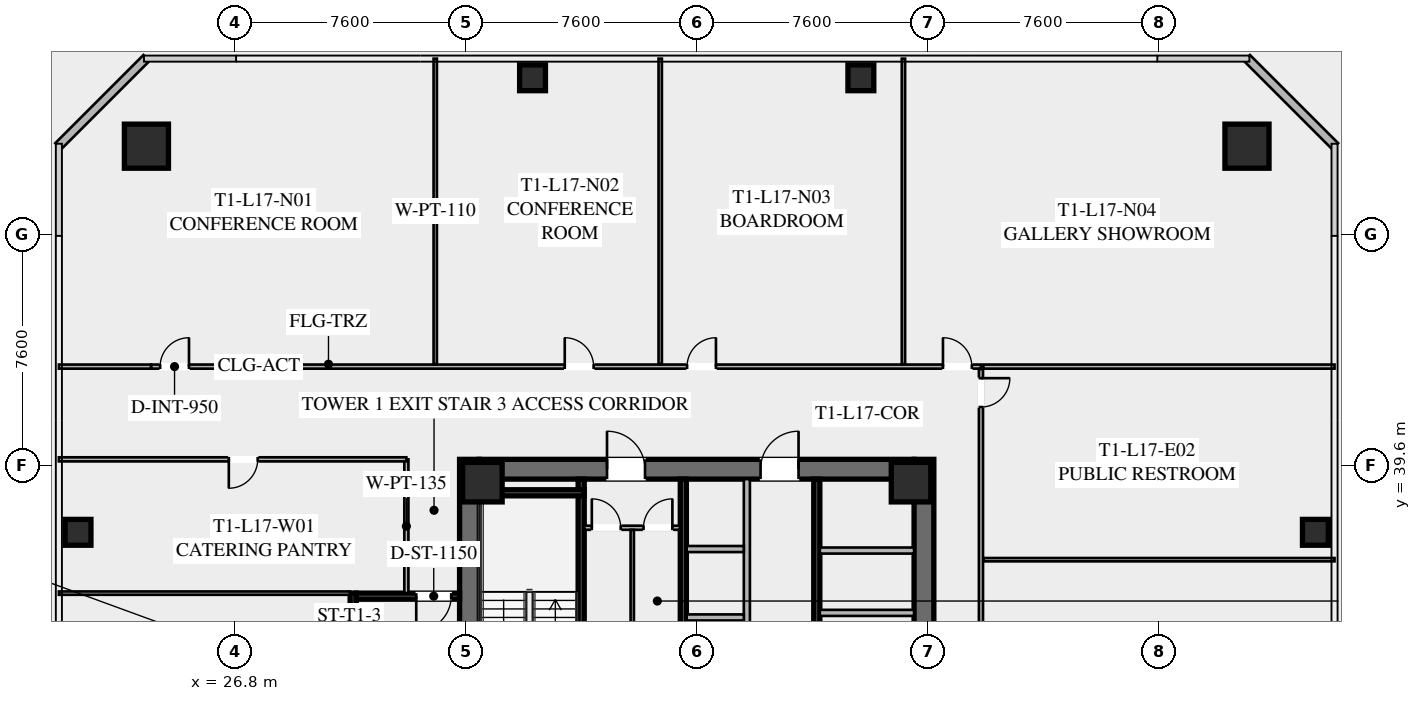
"""IFC4 building model, lengths in metres.
Left out: names, types, materials, properties, quantities, classifications, styles, units other than length and angle.
Written with IfcOpenShell. Run it as: python <this file> out.ifc"""

import sys

from ifc_helpers import new_model, si_unit, direction, frame, frame_2d, origin, origin_2d, place, context, subcontext, project, spatial, rectangle, hollow_rectangle, extrude, element, fill, save


model = new_model("IFC4")
c1 = context("Model", 3, precision=1e-05, world=origin(), true_north=direction((0.0, 1.0)))
c2 = subcontext(c1, "Body", "Model", "MODEL_VIEW")
j1 = project(units=[si_unit("LENGTHUNIT", "METRE"), si_unit("PLANEANGLEUNIT", "RADIAN")], contexts=[c1])
p1 = place(None, origin())
s1 = spatial("IfcSite", under=j1, at=p1, CompositionType="ELEMENT")
p2 = place(p1, origin())
s2 = spatial("IfcBuilding", under=s1, at=p2, CompositionType="ELEMENT")
p3 = place(p2, frame((0.0, 0.0, 67.2)))
s3 = spatial("IfcBuildingStorey", under=s2, at=p3, CompositionType="ELEMENT", Elevation=67.2)
for number, where, z_axis, x_axis in (
    (1, (34.525, 24.2, 0.0), (0.0, 0.0, 1.0), (0.0, 1.0, 0.0)),
    (2, (49.475, 39.8, 0.0), (0.0, 0.0, 1.0), (0.0, -1.0, 0.0)),
):
    element("IfcWall", number, at=place(p3, frame(where, z_axis=z_axis, x_axis=x_axis)), inside=s3, PredefinedType="SHEAR", context=c2, shape_type="SweptSolid", body=[
        extrude(rectangle(XDim=15.6, YDim=0.65, at=frame_2d((7.8, 0.0))), origin(), (0.0, 0.0, 1.0), 3.55),
    ])
p4 = place(p3, frame((34.85, 39.475, 0.0), z_axis=(0.0, 0.0, 1.0), x_axis=(1.0, 0.0, 0.0)))
e3 = element("IfcWall", 3, at=p4, inside=s3, PredefinedType="SHEAR", context=c2, shape_type="SweptSolid", body=[
    extrude(rectangle(XDim=14.3, YDim=0.65, at=frame_2d((7.15, 0.0))), origin(), (0.0, 0.0, 1.0), 3.55),
])
p5 = place(p4, frame((4.2, 0.0, 0.0)))
e4 = element("IfcOpeningElement", 4, at=p5, cuts=e3, PredefinedType="OPENING", context=c2, shape_type="SweptSolid", body=[
    extrude(rectangle(XDim=1.25, YDim=2.25, at=frame_2d((0.625, 1.125))), frame((0.0, 0.335, 0.0), z_axis=(0.0, -1.0, 0.0), x_axis=(1.0, 0.0, 0.0)), (0.0, 0.0, 1.0), 0.67),
])
p6 = place(p4, frame((9.25, 0.0, 0.0)))
e5 = element("IfcOpeningElement", 5, at=p6, cuts=e3, PredefinedType="OPENING", context=c2, shape_type="SweptSolid", body=[
    extrude(rectangle(XDim=1.25, YDim=2.25, at=frame_2d((0.625, 1.125))), frame((0.0, 0.335, 0.0), z_axis=(0.0, -1.0, 0.0), x_axis=(1.0, 0.0, 0.0)), (0.0, 0.0, 1.0), 0.67),
])
for number, where, z_axis, x_axis in (
    (6, (49.05, 39.05, 0.0), (0.0, 0.0, 1.0), (1.0, 0.0, 0.0)),
    (7, (34.95, 39.05, 0.0), (0.0, 0.0, 1.0), (1.0, 0.0, 0.0)),
):
    element("IfcColumn", number, at=place(p3, frame(where, z_axis=z_axis, x_axis=x_axis)), inside=s3, PredefinedType="COLUMN", context=c2, shape_type="SweptSolid", body=[
        extrude(hollow_rectangle(XDim=1.3, YDim=1.3, WallThickness=0.05, at=origin_2d()), origin(), (0.0, 0.0, 1.0), 3.35),
    ])
for number, where, z_axis, x_axis in (
    (8, (60.1, 50.1, -0.195), (0.0, 0.0, 1.0), (1.0, 0.0, 0.0)),
    (9, (23.9, 50.1, -0.195), (0.0, 0.0, 1.0), (1.0, 0.0, 0.0)),
):
    element("IfcColumn", number, at=place(p3, frame(where, z_axis=z_axis, x_axis=x_axis)), inside=s3, PredefinedType="COLUMN", context=c2, shape_type="SweptSolid", body=[
        extrude(hollow_rectangle(XDim=1.45, YDim=1.45, WallThickness=0.055, at=origin_2d()), origin(), (0.0, 0.0, 1.0), 3.545),
    ])
for number, where, z_axis, x_axis in (
    (10, (62.35, 37.4, -0.195), (0.0, 0.0, 1.0), (1.0, 0.0, 0.0)),
    (11, (47.4, 52.35, -0.195), (0.0, 0.0, 1.0), (1.0, 0.0, 0.0)),
    (12, (36.6, 52.35, -0.195), (0.0, 0.0, 1.0), (1.0, 0.0, 0.0)),
    (13, (21.65, 37.4, -0.195), (0.0, 0.0, 1.0), (1.0, 0.0, 0.0)),
):
    element("IfcColumn", number, at=place(p3, frame(where, z_axis=z_axis, x_axis=x_axis)), inside=s3, PredefinedType="COLUMN", context=c2, shape_type="SweptSolid", body=[
        extrude(hollow_rectangle(XDim=0.85, YDim=0.85, WallThickness=0.035, at=origin_2d()), origin(), (0.0, 0.0, 1.0), 3.545),
    ])
for number, where, z_axis, x_axis in (
    (14, (21.0, 50.1, 0.0), (0.0, 0.0, 1.0), (0.707, 0.707, 0.0)),
    (15, (60.1, 53.0, 0.0), (0.0, 0.0, 1.0), (0.707, -0.707, 0.0)),
):
    element("IfcWall", number, at=place(p3, frame(where, z_axis=z_axis, x_axis=x_axis)), inside=s3, PredefinedType="SOLIDWALL", context=c2, shape_type="SweptSolid", body=[
        extrude(rectangle(XDim=4.101, YDim=0.28, at=frame_2d((2.051, 0.0))), origin(), (0.0, 0.0, 1.0), 3.35),
    ])
p7 = place(p3, frame((38.2, 31.2, 0.0), z_axis=(0.0, 0.0, 1.0), x_axis=(0.0, 1.0, 0.0)))
e16 = element("IfcWall", 16, at=p7, inside=s3, PredefinedType="SHEAR", context=c2, shape_type="SweptSolid", body=[
    extrude(rectangle(XDim=7.95, YDim=0.2, at=frame_2d((3.975, 0.0))), origin(), (0.0, 0.0, 1.0), 3.35),
])
p8 = place(p7, frame((0.45, 0.0, 0.0)))
e17 = element("IfcOpeningElement", 17, at=p8, cuts=e16, PredefinedType="OPENING", context=c2, shape_type="SweptSolid", body=[
    extrude(rectangle(XDim=1.15, YDim=2.2, at=frame_2d((0.575, 1.1))), frame((0.0, 0.11, 0.0), z_axis=(0.0, -1.0, 0.0), x_axis=(1.0, 0.0, 0.0)), (0.0, 0.0, 1.0), 0.22),
])
p9 = place(p3, frame((34.85, 38.7, 0.0), z_axis=(0.0, 0.0, 1.0), x_axis=(1.0, 0.0, 0.0)))
e18 = element("IfcWall", 18, at=p9, inside=s3, PredefinedType="SHEAR", context=c2, shape_type="SweptSolid", body=[
    extrude(rectangle(XDim=3.45, YDim=0.2, at=frame_2d((1.725, 0.0))), origin(), (0.0, 0.0, 1.0), 3.35),
])
p10 = place(p3, frame((41.56, 24.85, 0.0), z_axis=(0.0, 0.0, 1.0), x_axis=(0.0, 1.0, 0.0)))
e19 = element("IfcWall", 19, at=p10, inside=s3, PredefinedType="SHEAR", context=c2, shape_type="SweptSolid", body=[
    extrude(rectangle(XDim=14.3, YDim=0.2, at=frame_2d((7.15, 0.0))), origin(), (0.0, 0.0, 1.0), 3.35),
])
p11 = place(p3, frame((45.95, 39.15, 0.0), z_axis=(0.0, 0.0, 1.0), x_axis=(0.0, -1.0, 0.0)))
e20 = element("IfcWall", 20, at=p11, inside=s3, PredefinedType="SHEAR", context=c2, shape_type="SweptSolid", body=[
    extrude(rectangle(XDim=6.35, YDim=0.2, at=frame_2d((3.175, 0.0))), origin(), (0.0, 0.0, 1.0), 3.35),
])
for number, where, z_axis, x_axis in (
    (21, (46.05, 34.75, 0.0), (0.0, 0.0, 1.0), (1.0, 0.0, 0.0)),
    (22, (46.05, 36.8, 0.0), (0.0, 0.0, 1.0), (1.0, 0.0, 0.0)),
):
    element("IfcWall", number, at=place(p3, frame(where, z_axis=z_axis, x_axis=x_axis)), inside=s3, PredefinedType="SOLIDWALL", context=c2, shape_type="SweptSolid", body=[
        extrude(rectangle(XDim=3.1, YDim=0.2, at=frame_2d((1.55, 0.0))), origin(), (0.0, 0.0, 1.0), 3.35),
    ])
p12 = place(p3, frame((38.3, 37.55, 0.0), z_axis=(0.0, 0.0, 1.0), x_axis=(1.0, 0.0, 0.0)))
e23 = element("IfcWall", 23, at=p12, inside=s3, PredefinedType="PARTITIONING", context=c2, shape_type="SweptSolid", body=[
    extrude(rectangle(XDim=3.15, YDim=0.135, at=frame_2d((1.575, 0.0))), origin(), (0.0, 0.0, 1.0), 2.703),
])
p13 = place(p12, frame((0.25, 0.0, 0.0)))
e24 = element("IfcOpeningElement", 24, at=p13, cuts=e23, PredefinedType="OPENING", context=c2, shape_type="SweptSolid", body=[
    extrude(rectangle(XDim=0.95, YDim=2.05, at=frame_2d((0.475, 1.025))), frame((0.0, 0.077, 0.0), z_axis=(0.0, -1.0, 0.0), x_axis=(1.0, 0.0, 0.0)), (0.0, 0.0, 1.0), 0.155),
])
p14 = place(p12, frame((1.95, 0.0, 0.0)))
e25 = element("IfcOpeningElement", 25, at=p14, cuts=e23, PredefinedType="OPENING", context=c2, shape_type="SweptSolid", body=[
    extrude(rectangle(XDim=0.95, YDim=2.05, at=frame_2d((0.475, 1.025))), frame((0.0, 0.077, 0.0), z_axis=(0.0, -1.0, 0.0), x_axis=(1.0, 0.0, 0.0)), (0.0, 0.0, 1.0), 0.155),
])
p15 = place(p3, frame((39.88, 33.68, 0.0), z_axis=(0.0, 0.0, 1.0), x_axis=(0.0, 1.0, 0.0)))
e26 = element("IfcWall", 26, at=p15, inside=s3, PredefinedType="PARTITIONING", context=c2, shape_type="SweptSolid", body=[
    extrude(rectangle(XDim=3.8, YDim=0.11, at=frame_2d((1.9, 0.0))), origin(), (0.0, 0.0, 1.0), 2.703),
])
p16 = place(p3, frame((43.65, 32.35, 0.0), z_axis=(0.0, 0.0, 1.0), x_axis=(0.0, 1.0, 0.0)))
e27 = element("IfcWall", 27, at=p16, inside=s3, PredefinedType="SOLIDWALL", context=c2, shape_type="SweptSolid", body=[
    extrude(rectangle(XDim=6.8, YDim=0.2, at=frame_2d((3.4, 0.0))), origin(), (0.0, 0.0, 1.0), 3.35),
])
for number, where, z_axis, x_axis in (
    (28, (41.67, 34.6, 0.0), (0.0, 0.0, 1.0), (1.0, 0.0, 0.0)),
    (29, (41.67, 36.85, 0.0), (0.0, 0.0, 1.0), (1.0, 0.0, 0.0)),
):
    element("IfcWall", number, at=place(p3, frame(where, z_axis=z_axis, x_axis=x_axis)), inside=s3, PredefinedType="SOLIDWALL", context=c2, shape_type="SweptSolid", body=[
        extrude(rectangle(XDim=1.88, YDim=0.2, at=frame_2d((0.94, 0.0))), origin(), (0.0, 0.0, 1.0), 3.35),
    ])
p17 = place(p3, frame((30.7, 28.6, 0.0), z_axis=(0.0, 0.0, 1.0), x_axis=(0.0, 1.0, 0.0)))
e30 = element("IfcWall", 30, at=p17, inside=s3, PredefinedType="SHEAR", context=c2, shape_type="SweptSolid", body=[
    extrude(rectangle(XDim=6.8, YDim=0.2, at=frame_2d((3.4, 0.0))), origin(), (0.0, 0.0, 1.0), 3.35),
])
p18 = place(p3, frame((34.2, 35.3, 0.0), z_axis=(0.0, 0.0, 1.0), x_axis=(-1.0, 0.0, 0.0)))
e31 = element("IfcWall", 31, at=p18, inside=s3, PredefinedType="SHEAR", context=c2, shape_type="SweptSolid", body=[
    extrude(rectangle(XDim=3.4, YDim=0.2, at=frame_2d((1.7, 0.0))), origin(), (0.0, 0.0, 1.0), 3.35),
])
p19 = place(p18, frame((0.275, 0.0, 0.0)))
e32 = element("IfcOpeningElement", 32, at=p19, cuts=e31, PredefinedType="OPENING", context=c2, shape_type="SweptSolid", body=[
    extrude(rectangle(XDim=1.15, YDim=2.2, at=frame_2d((0.575, 1.1))), frame((0.0, 0.11, 0.0), z_axis=(0.0, -1.0, 0.0), x_axis=(1.0, 0.0, 0.0)), (0.0, 0.0, 1.0), 0.22),
])
p20 = place(p3, frame((32.45, 35.4, 0.0), z_axis=(0.0, 0.0, 1.0), x_axis=(0.0, 1.0, 0.0)))
e33 = element("IfcWall", 33, at=p20, inside=s3, PredefinedType="PARTITIONING", context=c2, shape_type="SweptSolid", body=[
    extrude(rectangle(XDim=4.4, YDim=0.135, at=frame_2d((2.2, 0.0))), origin(), (0.0, 0.0, 1.0), 2.703),
])
p21 = place(p3, frame((24.05, 42.85, 0.0), z_axis=(0.0, 0.0, 1.0), x_axis=(1.0, 0.0, 0.0)))
e34 = element("IfcWall", 34, at=p21, inside=s3, PredefinedType="PARTITIONING", context=c2, shape_type="SweptSolid", body=[
    extrude(rectangle(XDim=27.3, YDim=0.135, at=frame_2d((13.65, 0.0))), origin(), (0.0, 0.0, 1.0), 2.703),
])
p22 = place(p21, frame((0.3, 0.0, 0.0)))
e35 = element("IfcOpeningElement", 35, at=p22, cuts=e34, PredefinedType="OPENING", context=c2, shape_type="SweptSolid", body=[
    extrude(rectangle(XDim=0.95, YDim=2.05, at=frame_2d((0.475, 1.025))), frame((0.0, 0.077, 0.0), z_axis=(0.0, -1.0, 0.0), x_axis=(1.0, 0.0, 0.0)), (0.0, 0.0, 1.0), 0.155),
])
p23 = place(p21, frame((13.61, 0.0, 0.0)))
e36 = element("IfcOpeningElement", 36, at=p23, cuts=e34, PredefinedType="OPENING", context=c2, shape_type="SweptSolid", body=[
    extrude(rectangle(XDim=0.95, YDim=2.05, at=frame_2d((0.475, 1.025))), frame((0.0, 0.077, 0.0), z_axis=(0.0, -1.0, 0.0), x_axis=(1.0, 0.0, 0.0)), (0.0, 0.0, 1.0), 0.155),
])
p24 = place(p21, frame((17.633, 0.0, 0.0)))
e37 = element("IfcOpeningElement", 37, at=p24, cuts=e34, PredefinedType="OPENING", context=c2, shape_type="SweptSolid", body=[
    extrude(rectangle(XDim=0.95, YDim=2.05, at=frame_2d((0.475, 1.025))), frame((0.0, 0.077, 0.0), z_axis=(0.0, -1.0, 0.0), x_axis=(1.0, 0.0, 0.0)), (0.0, 0.0, 1.0), 0.155),
])
p25 = place(p21, frame((26.05, 0.0, 0.0)))
e38 = element("IfcOpeningElement", 38, at=p25, cuts=e34, PredefinedType="OPENING", context=c2, shape_type="SweptSolid", body=[
    extrude(rectangle(XDim=0.95, YDim=2.05, at=frame_2d((0.475, 1.025))), frame((0.0, 0.077, 0.0), z_axis=(0.0, -1.0, 0.0), x_axis=(1.0, 0.0, 0.0)), (0.0, 0.0, 1.0), 0.155),
])
p26 = place(p3, frame((21.02, 42.85, 0.0), z_axis=(0.0, 0.0, 1.0), x_axis=(1.0, 0.0, 0.0)))
e39 = element("IfcWall", 39, at=p26, inside=s3, PredefinedType="PARTITIONING", context=c2, shape_type="SweptSolid", body=[
    extrude(rectangle(XDim=3.03, YDim=0.135, at=frame_2d((1.515, 0.0))), origin(), (0.0, 0.0, 1.0), 2.703),
])
for number, where, z_axis, x_axis in (
    (40, (33.4, 42.93, 0.0), (0.0, 0.0, 1.0), (0.0, 1.0, 0.0)),
    (41, (40.8, 42.93, 0.0), (0.0, 0.0, 1.0), (0.0, 1.0, 0.0)),
    (42, (48.8, 42.93, 0.0), (0.0, 0.0, 1.0), (0.0, 1.0, 0.0)),
):
    element("IfcWall", number, at=place(p3, frame(where, z_axis=z_axis, x_axis=x_axis)), inside=s3, PredefinedType="PARTITIONING", context=c2, shape_type="SweptSolid", body=[
        extrude(rectangle(XDim=10.05, YDim=0.11, at=frame_2d((5.025, 0.0))), origin(), (0.0, 0.0, 1.0), 2.703),
    ])
p27 = place(p3, frame((51.35, 42.77, 0.0), z_axis=(0.0, 0.0, 1.0), x_axis=(0.0, -1.0, 0.0)))
e43 = element("IfcWall", 43, at=p27, inside=s3, PredefinedType="PARTITIONING", context=c2, shape_type="SweptSolid", body=[
    extrude(rectangle(XDim=20.26, YDim=0.135, at=frame_2d((10.13, 0.0))), origin(), (0.0, 0.0, 1.0), 2.703),
])
p28 = place(p27, frame((10.181, 0.0, 0.0)))
e44 = element("IfcOpeningElement", 44, at=p28, cuts=e43, PredefinedType="OPENING", context=c2, shape_type="SweptSolid", body=[
    extrude(rectangle(XDim=0.95, YDim=2.05, at=frame_2d((0.475, 1.025))), frame((0.0, 0.077, 0.0), z_axis=(0.0, -1.0, 0.0), x_axis=(1.0, 0.0, 0.0)), (0.0, 0.0, 1.0), 0.155),
])
p29 = place(p27, frame((0.3, 0.0, 0.0)))
e45 = element("IfcOpeningElement", 45, at=p29, cuts=e43, PredefinedType="OPENING", context=c2, shape_type="SweptSolid", body=[
    extrude(rectangle(XDim=0.95, YDim=2.05, at=frame_2d((0.475, 1.025))), frame((0.0, 0.077, 0.0), z_axis=(0.0, -1.0, 0.0), x_axis=(1.0, 0.0, 0.0)), (0.0, 0.0, 1.0), 0.155),
])
p30 = place(p3, frame((62.98, 42.85, 0.0), z_axis=(0.0, 0.0, 1.0), x_axis=(-1.0, 0.0, 0.0)))
e46 = element("IfcWall", 46, at=p30, inside=s3, PredefinedType="PARTITIONING", context=c2, shape_type="SweptSolid", body=[
    extrude(rectangle(XDim=11.55, YDim=0.135, at=frame_2d((5.775, 0.0))), origin(), (0.0, 0.0, 1.0), 2.703),
])
p31 = place(p3, frame((51.43, 36.5, 0.0), z_axis=(0.0, 0.0, 1.0), x_axis=(1.0, 0.0, 0.0)))
e47 = element("IfcWall", 47, at=p31, inside=s3, PredefinedType="PARTITIONING", context=c2, shape_type="SweptSolid", body=[
    extrude(rectangle(XDim=11.55, YDim=0.11, at=frame_2d((5.775, 0.0))), origin(), (0.0, 0.0, 1.0), 2.703),
])
p32 = place(p3, frame((32.45, 39.8, 0.0), z_axis=(0.0, 0.0, 1.0), x_axis=(-1.0, 0.0, 0.0)))
e48 = element("IfcWall", 48, at=p32, inside=s3, PredefinedType="PARTITIONING", context=c2, shape_type="SweptSolid", body=[
    extrude(rectangle(XDim=11.43, YDim=0.135, at=frame_2d((5.715, 0.0))), origin(), (0.0, 0.0, 1.0), 2.703),
])
p33 = place(p32, frame((4.89, 0.0, 0.0)))
e49 = element("IfcOpeningElement", 49, at=p33, cuts=e48, PredefinedType="OPENING", context=c2, shape_type="SweptSolid", body=[
    extrude(rectangle(XDim=0.95, YDim=2.05, at=frame_2d((0.475, 1.025))), frame((0.0, 0.077, 0.0), z_axis=(0.0, -1.0, 0.0), x_axis=(1.0, 0.0, 0.0)), (0.0, 0.0, 1.0), 0.155),
])
p34 = place(p3, frame((30.6, 35.4, 0.0), z_axis=(0.0, 0.0, 1.0), x_axis=(-1.0, 0.0, 0.0)))
e50 = element("IfcWall", 50, at=p34, inside=s3, PredefinedType="PARTITIONING", context=c2, shape_type="SweptSolid", body=[
    extrude(rectangle(XDim=9.58, YDim=0.11, at=frame_2d((4.79, 0.0))), origin(), (0.0, 0.0, 1.0), 2.703),
])
p35 = place(p5, origin())
e51 = element("IfcDoor", 51, at=p35, inside=s3, OperationType="SINGLE_SWING_LEFT", PredefinedType="DOOR", context=c2, shape_type="SweptSolid", body=[
    extrude(rectangle(XDim=1.25, YDim=2.25, at=frame_2d((0.625, 1.125))), frame((0.0, 0.025, 0.0), z_axis=(0.0, -1.0, 0.0), x_axis=(1.0, 0.0, 0.0)), (0.0, 0.0, 1.0), 0.05),
])
fill(e4, e51)
p36 = place(p6, origin())
e52 = element("IfcDoor", 52, at=p36, inside=s3, OperationType="SINGLE_SWING_RIGHT", PredefinedType="DOOR", context=c2, shape_type="SweptSolid", body=[
    extrude(rectangle(XDim=1.25, YDim=2.25, at=frame_2d((0.625, 1.125))), frame((0.0, 0.025, 0.0), z_axis=(0.0, -1.0, 0.0), x_axis=(1.0, 0.0, 0.0)), (0.0, 0.0, 1.0), 0.05),
])
fill(e5, e52)
p37 = place(p13, origin())
e53 = element("IfcDoor", 53, at=p37, inside=s3, OperationType="SINGLE_SWING_LEFT", PredefinedType="DOOR", context=c2, shape_type="SweptSolid", body=[
    extrude(rectangle(XDim=0.95, YDim=2.05, at=frame_2d((0.475, 1.025))), frame((0.0, 0.025, 0.0), z_axis=(0.0, -1.0, 0.0), x_axis=(1.0, 0.0, 0.0)), (0.0, 0.0, 1.0), 0.05),
])
fill(e24, e53)
p38 = place(p14, origin())
e54 = element("IfcDoor", 54, at=p38, inside=s3, OperationType="SINGLE_SWING_RIGHT", PredefinedType="DOOR", context=c2, shape_type="SweptSolid", body=[
    extrude(rectangle(XDim=0.95, YDim=2.05, at=frame_2d((0.475, 1.025))), frame((0.0, 0.025, 0.0), z_axis=(0.0, -1.0, 0.0), x_axis=(1.0, 0.0, 0.0)), (0.0, 0.0, 1.0), 0.05),
])
fill(e25, e54)
p39 = place(p19, origin())
e55 = element("IfcDoor", 55, at=p39, inside=s3, OperationType="SINGLE_SWING_RIGHT", PredefinedType="DOOR", context=c2, shape_type="SweptSolid", body=[
    extrude(rectangle(XDim=1.15, YDim=2.2, at=frame_2d((0.575, 1.1))), frame((0.0, 0.025, 0.0), z_axis=(0.0, -1.0, 0.0), x_axis=(1.0, 0.0, 0.0)), (0.0, 0.0, 1.0), 0.05),
])
fill(e32, e55)
p40 = place(p22, origin())
e56 = element("IfcDoor", 56, at=p40, inside=s3, OperationType="SINGLE_SWING_RIGHT", PredefinedType="DOOR", context=c2, shape_type="SweptSolid", body=[
    extrude(rectangle(XDim=0.95, YDim=2.05, at=frame_2d((0.475, 1.025))), frame((0.0, 0.025, 0.0), z_axis=(0.0, -1.0, 0.0), x_axis=(1.0, 0.0, 0.0)), (0.0, 0.0, 1.0), 0.05),
])
fill(e35, e56)
p41 = place(p23, origin())
e57 = element("IfcDoor", 57, at=p41, inside=s3, OperationType="SINGLE_SWING_LEFT", PredefinedType="DOOR", context=c2, shape_type="SweptSolid", body=[
    extrude(rectangle(XDim=0.95, YDim=2.05, at=frame_2d((0.475, 1.025))), frame((0.0, 0.025, 0.0), z_axis=(0.0, -1.0, 0.0), x_axis=(1.0, 0.0, 0.0)), (0.0, 0.0, 1.0), 0.05),
])
fill(e36, e57)
p42 = place(p24, origin())
e58 = element("IfcDoor", 58, at=p42, inside=s3, OperationType="SINGLE_SWING_RIGHT", PredefinedType="DOOR", context=c2, shape_type="SweptSolid", body=[
    extrude(rectangle(XDim=0.95, YDim=2.05, at=frame_2d((0.475, 1.025))), frame((0.0, 0.025, 0.0), z_axis=(0.0, -1.0, 0.0), x_axis=(1.0, 0.0, 0.0)), (0.0, 0.0, 1.0), 0.05),
])
fill(e37, e58)
p43 = place(p25, origin())
e59 = element("IfcDoor", 59, at=p43, inside=s3, OperationType="SINGLE_SWING_LEFT", PredefinedType="DOOR", context=c2, shape_type="SweptSolid", body=[
    extrude(rectangle(XDim=0.95, YDim=2.05, at=frame_2d((0.475, 1.025))), frame((0.0, 0.025, 0.0), z_axis=(0.0, -1.0, 0.0), x_axis=(1.0, 0.0, 0.0)), (0.0, 0.0, 1.0), 0.05),
])
fill(e38, e59)
p44 = place(p29, origin())
e60 = element("IfcDoor", 60, at=p44, inside=s3, OperationType="SINGLE_SWING_LEFT", PredefinedType="DOOR", context=c2, shape_type="SweptSolid", body=[
    extrude(rectangle(XDim=0.95, YDim=2.05, at=frame_2d((0.475, 1.025))), frame((0.0, 0.025, 0.0), z_axis=(0.0, -1.0, 0.0), x_axis=(1.0, 0.0, 0.0)), (0.0, 0.0, 1.0), 0.05),
])
fill(e45, e60)
p45 = place(p33, origin())
e61 = element("IfcDoor", 61, at=p45, inside=s3, OperationType="SINGLE_SWING_RIGHT", PredefinedType="DOOR", context=c2, shape_type="SweptSolid", body=[
    extrude(rectangle(XDim=0.95, YDim=2.05, at=frame_2d((0.475, 1.025))), frame((0.0, 0.025, 0.0), z_axis=(0.0, -1.0, 0.0), x_axis=(1.0, 0.0, 0.0)), (0.0, 0.0, 1.0), 0.05),
])
fill(e49, e61)
save(model, sys.argv[1])
